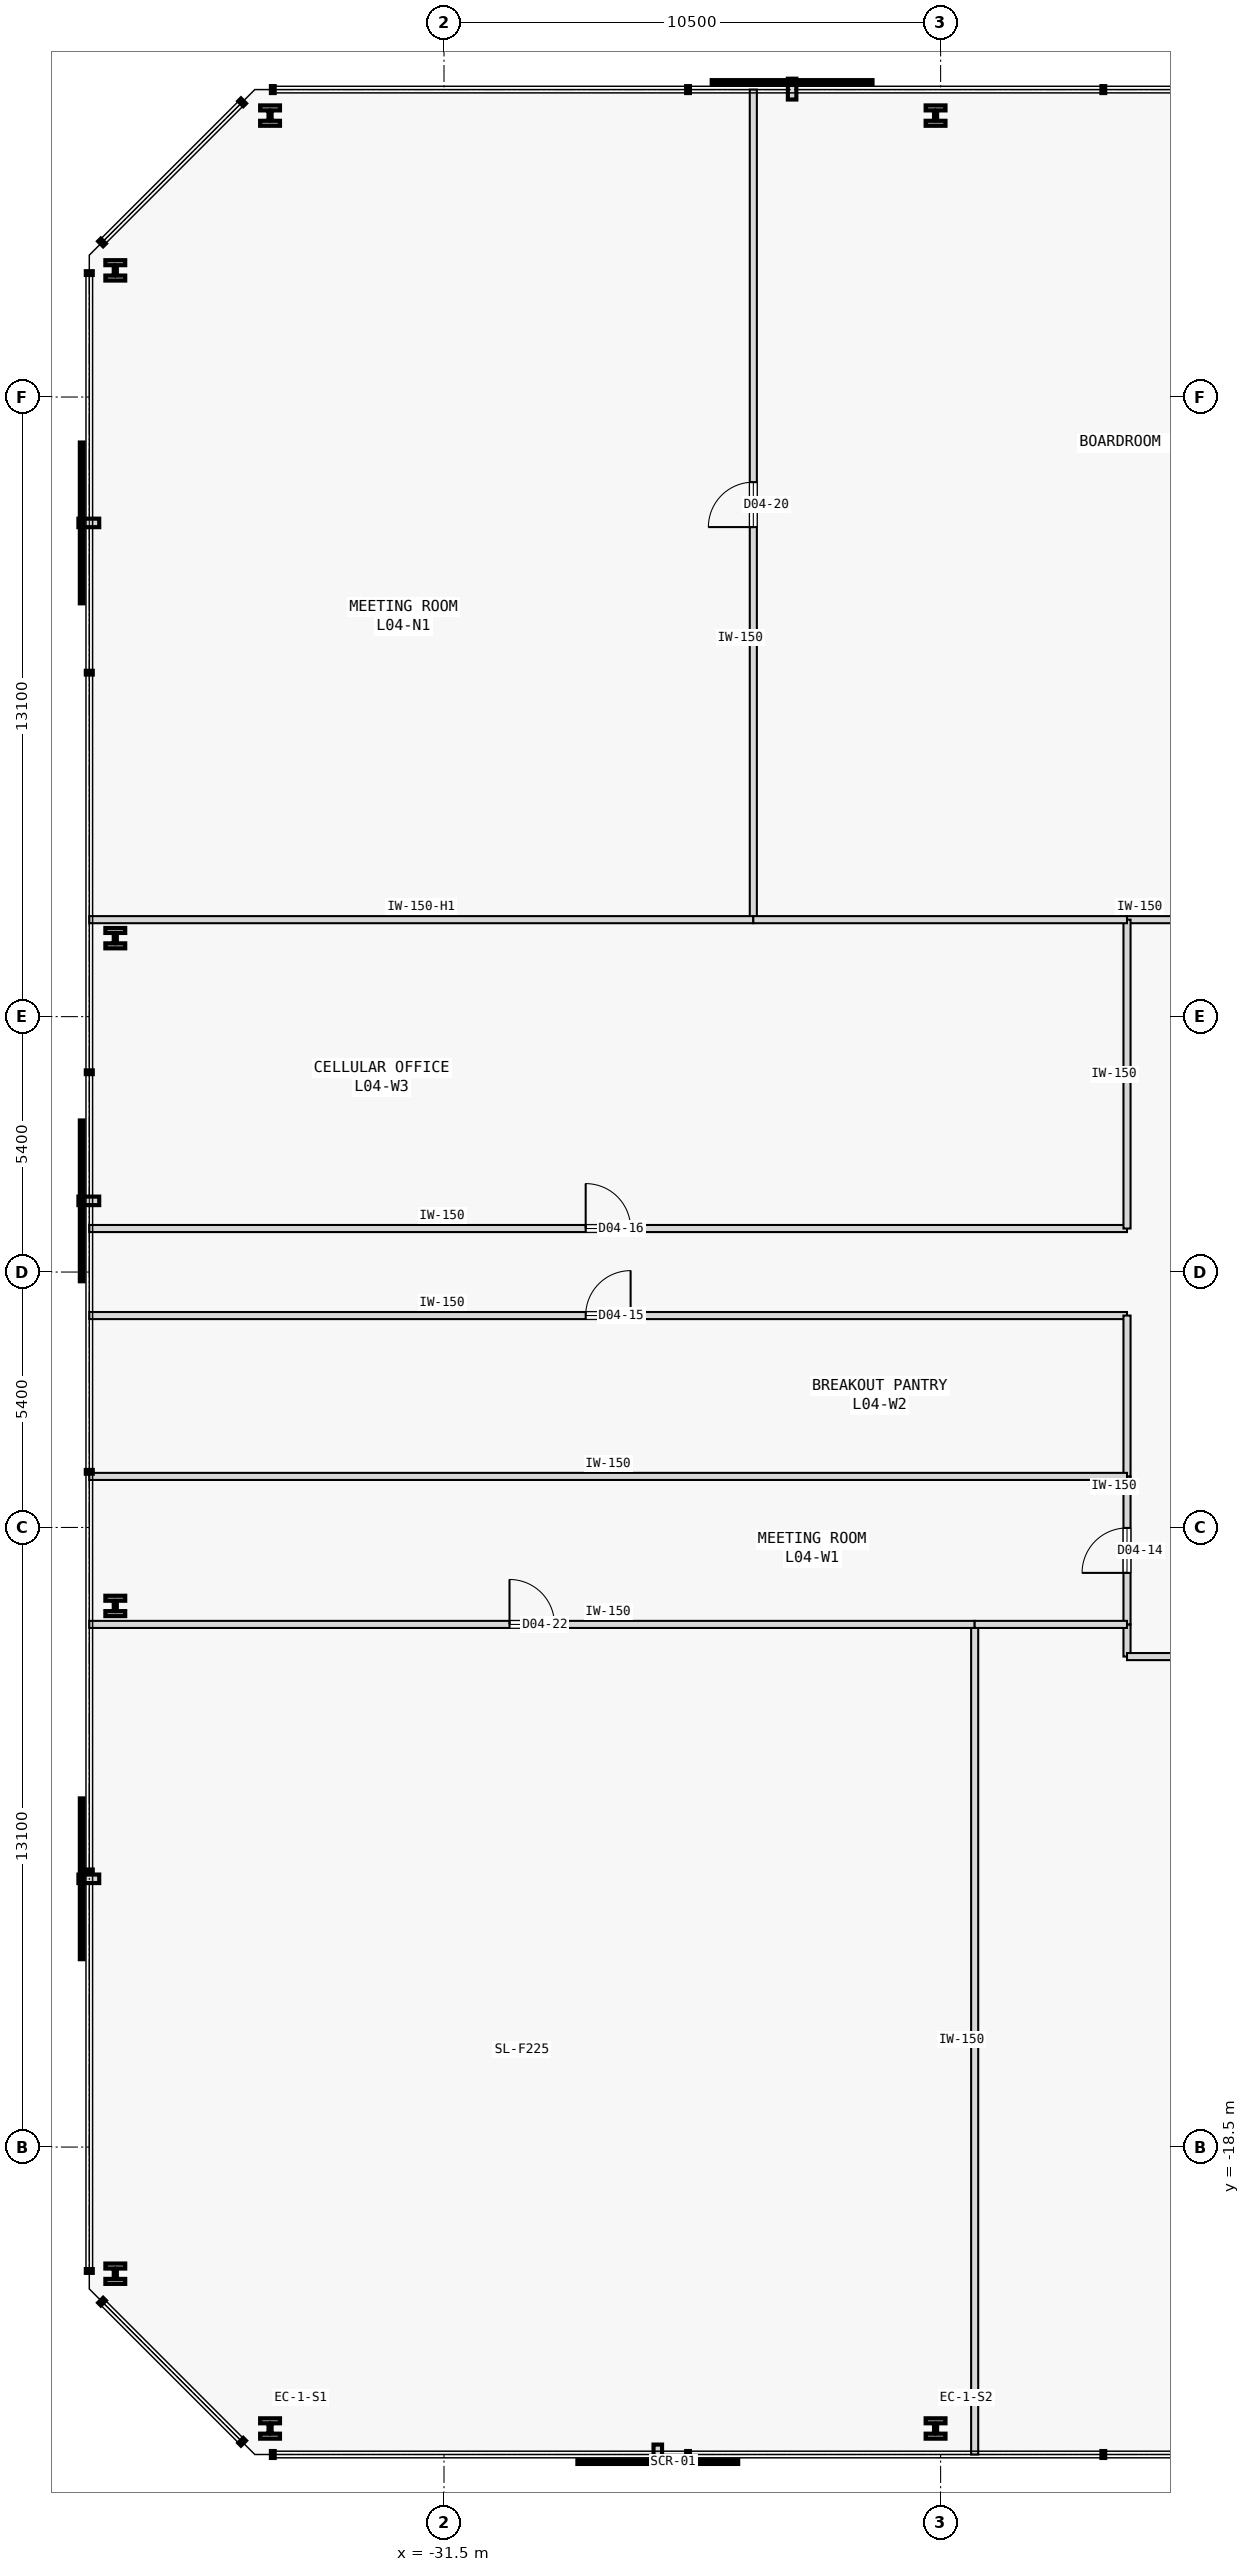
"""IFC4 building model, lengths in metres.
Left out: names, types, materials, properties, quantities, classifications, styles, units other than length and angle.
Written with IfcOpenShell. Run it as: python <this file> out.ifc"""

import sys

from ifc_helpers import new_model, si_unit, direction, frame, frame_2d, origin, origin_2d, place, context, subcontext, project, spatial, rectangle, i_section, extrude, element, fill, save


model = new_model("IFC4")
c1 = context("Model", 3, precision=1e-05, world=origin(), true_north=direction((0.0, 1.0)))
c2 = subcontext(c1, "Body", "Model", "MODEL_VIEW")
j1 = project(units=[si_unit("LENGTHUNIT", "METRE"), si_unit("PLANEANGLEUNIT", "RADIAN")], contexts=[c1])
p1 = place(None, origin())
s1 = spatial("IfcSite", under=j1, at=p1, CompositionType="ELEMENT")
p2 = place(p1, origin())
s2 = spatial("IfcBuilding", under=s1, at=p2, CompositionType="ELEMENT")
p3 = place(p2, frame((0.0, 0.0, 21.8)))
s3 = spatial("IfcBuildingStorey", under=s2, at=p3, CompositionType="ELEMENT", Elevation=21.8)
for number, where, z_axis, x_axis in (
    (1, (-35.178, -24.45, 0.0), (0.0, 0.0, 1.0), (1.0, 0.0, 0.0)),
    (2, (-21.107, -24.45, 0.0), (0.0, 0.0, 1.0), (1.0, 0.0, 0.0)),
    (3, (-21.107, 24.45, 0.0), (0.0, 0.0, 1.0), (1.0, 0.0, 0.0)),
    (4, (-35.178, 24.45, 0.0), (0.0, 0.0, 1.0), (1.0, 0.0, 0.0)),
    (5, (-38.45, 21.178, 0.0), (0.0, 0.0, 1.0), (1.0, 0.0, 0.0)),
    (6, (-38.45, 7.059, 0.0), (0.0, 0.0, 1.0), (1.0, 0.0, 0.0)),
    (7, (-38.45, -7.059, 0.0), (0.0, 0.0, 1.0), (1.0, 0.0, 0.0)),
    (8, (-38.45, -21.178, 0.0), (0.0, 0.0, 1.0), (1.0, 0.0, 0.0)),
):
    element("IfcColumn", number, at=place(p3, frame(where, z_axis=z_axis, x_axis=x_axis)), inside=s3, PredefinedType="COLUMN", context=c2, shape_type="SweptSolid", body=[
        extrude(i_section(OverallWidth=0.42, OverallDepth=0.431, WebThickness=0.065, FlangeThickness=0.106, FilletRadius=0.015, at=origin_2d()), origin(), (0.0, 0.0, 1.0), 3.8),
    ])
p4 = place(p3, frame((-17.059, 7.45, 0.0), z_axis=(0.0, 0.0, 1.0), x_axis=(1.0, 0.0, 0.0)))
e9 = element("IfcWall", 9, at=p4, inside=s3, PredefinedType="PARTITIONING", context=c2, shape_type="SweptSolid", body=[
    extrude(rectangle(XDim=7.699, YDim=0.15, at=frame_2d((3.85, 0.0))), origin(), (0.0, 0.0, 1.0), 3.575),
])
p5 = place(p4, frame((3.375, 0.0, 0.0)))
e10 = element("IfcOpeningElement", 10, at=p5, cuts=e9, PredefinedType="OPENING", context=c2, shape_type="SweptSolid", body=[
    extrude(rectangle(XDim=0.95, YDim=2.15, at=frame_2d((0.475, 1.075))), frame((0.0, 0.085, 0.0), z_axis=(0.0, -1.0, 0.0), x_axis=(1.0, 0.0, 0.0)), (0.0, 0.0, 1.0), 0.17),
])
p6 = place(p3, frame((-17.059, -8.13, 0.0), z_axis=(0.0, 0.0, 1.0), x_axis=(0.0, 1.0, 0.0)))
e11 = element("IfcWall", 11, at=p6, inside=s3, PredefinedType="PARTITIONING", context=c2, shape_type="SweptSolid", body=[
    extrude(rectangle(XDim=0.68, YDim=0.15, at=frame_2d((0.34, 0.0))), origin(), (0.0, 0.0, 1.0), 3.575),
])
p7 = place(p3, frame((-17.059, -8.13, 0.0), z_axis=(0.0, 0.0, 1.0), x_axis=(1.0, 0.0, 0.0)))
e12 = element("IfcWall", 12, at=p7, inside=s3, PredefinedType="PARTITIONING", context=c2, shape_type="SweptSolid", body=[
    extrude(rectangle(XDim=16.139, YDim=0.15, at=frame_2d((8.07, 0.0))), origin(), (0.0, 0.0, 1.0), 3.575),
])
p8 = place(p3, frame((-17.059, -7.45, 0.0), z_axis=(0.0, 0.0, 1.0), x_axis=(0.0, 1.0, 0.0)))
e13 = element("IfcWall", 13, at=p8, inside=s3, PredefinedType="PARTITIONING", context=c2, shape_type="SweptSolid", body=[
    extrude(rectangle(XDim=3.129, YDim=0.15, at=frame_2d((1.564, 0.0))), origin(), (0.0, 0.0, 1.0), 3.575),
])
p9 = place(p8, frame((1.09, 0.0, 0.0)))
e14 = element("IfcOpeningElement", 14, at=p9, cuts=e13, PredefinedType="OPENING", context=c2, shape_type="SweptSolid", body=[
    extrude(rectangle(XDim=0.95, YDim=2.15, at=frame_2d((0.475, 1.075))), frame((0.0, 0.085, 0.0), z_axis=(0.0, -1.0, 0.0), x_axis=(1.0, 0.0, 0.0)), (0.0, 0.0, 1.0), 0.17),
])
p10 = place(p3, frame((-39.0, -0.92, 0.0), z_axis=(0.0, 0.0, 1.0), x_axis=(1.0, 0.0, 0.0)))
e15 = element("IfcWall", 15, at=p10, inside=s3, PredefinedType="PARTITIONING", context=c2, shape_type="SweptSolid", body=[
    extrude(rectangle(XDim=21.941, YDim=0.15, at=frame_2d((10.97, 0.0))), origin(), (0.0, 0.0, 1.0), 3.575),
])
p11 = place(p10, frame((10.496, 0.0, 0.0)))
e16 = element("IfcOpeningElement", 16, at=p11, cuts=e15, PredefinedType="OPENING", context=c2, shape_type="SweptSolid", body=[
    extrude(rectangle(XDim=0.95, YDim=2.15, at=frame_2d((0.475, 1.075))), frame((0.0, 0.085, 0.0), z_axis=(0.0, -1.0, 0.0), x_axis=(1.0, 0.0, 0.0)), (0.0, 0.0, 1.0), 0.17),
])
p12 = place(p3, frame((-17.059, -4.321, 0.0), z_axis=(0.0, 0.0, 1.0), x_axis=(0.0, 1.0, 0.0)))
e17 = element("IfcWall", 17, at=p12, inside=s3, PredefinedType="PARTITIONING", context=c2, shape_type="SweptSolid", body=[
    extrude(rectangle(XDim=3.401, YDim=0.15, at=frame_2d((1.701, 0.0))), origin(), (0.0, 0.0, 1.0), 3.575),
])
p13 = place(p3, frame((-39.0, 0.92, 0.0), z_axis=(0.0, 0.0, 1.0), x_axis=(1.0, 0.0, 0.0)))
e18 = element("IfcWall", 18, at=p13, inside=s3, PredefinedType="PARTITIONING", context=c2, shape_type="SweptSolid", body=[
    extrude(rectangle(XDim=21.941, YDim=0.15, at=frame_2d((10.97, 0.0))), origin(), (0.0, 0.0, 1.0), 3.575),
])
p14 = place(p13, frame((10.496, 0.0, 0.0)))
e19 = element("IfcOpeningElement", 19, at=p14, cuts=e18, PredefinedType="OPENING", context=c2, shape_type="SweptSolid", body=[
    extrude(rectangle(XDim=0.95, YDim=2.15, at=frame_2d((0.475, 1.075))), frame((0.0, 0.085, 0.0), z_axis=(0.0, -1.0, 0.0), x_axis=(1.0, 0.0, 0.0)), (0.0, 0.0, 1.0), 0.17),
])
p15 = place(p3, frame((-17.059, 0.92, 0.0), z_axis=(0.0, 0.0, 1.0), x_axis=(0.0, 1.0, 0.0)))
e20 = element("IfcWall", 20, at=p15, inside=s3, PredefinedType="PARTITIONING", context=c2, shape_type="SweptSolid", body=[
    extrude(rectangle(XDim=6.53, YDim=0.15, at=frame_2d((3.265, 0.0))), origin(), (0.0, 0.0, 1.0), 3.575),
])
p16 = place(p3, frame((-24.96, 7.45, 0.0), z_axis=(0.0, 0.0, 1.0), x_axis=(0.0, 1.0, 0.0)))
e21 = element("IfcWall", 21, at=p16, inside=s3, PredefinedType="PARTITIONING", context=c2, shape_type="SweptSolid", body=[
    extrude(rectangle(XDim=17.55, YDim=0.15, at=frame_2d((8.775, 0.0))), origin(), (0.0, 0.0, 1.0), 3.575),
])
p17 = place(p16, frame((8.3, 0.0, 0.0)))
e22 = element("IfcOpeningElement", 22, at=p17, cuts=e21, PredefinedType="OPENING", context=c2, shape_type="SweptSolid", body=[
    extrude(rectangle(XDim=0.95, YDim=2.15, at=frame_2d((0.475, 1.075))), frame((0.0, 0.085, 0.0), z_axis=(0.0, -1.0, 0.0), x_axis=(1.0, 0.0, 0.0)), (0.0, 0.0, 1.0), 0.17),
])
p18 = place(p3, frame((-39.0, 7.45, 0.0), z_axis=(0.0, 0.0, 1.0), x_axis=(1.0, 0.0, 0.0)))
e23 = element("IfcWall", 23, at=p18, inside=s3, PredefinedType="PARTITIONING", context=c2, shape_type="SweptSolid", body=[
    extrude(rectangle(XDim=14.04, YDim=0.15, at=frame_2d((7.02, 0.0))), origin(), (0.0, 0.0, 1.0), 3.125),
])
p19 = place(p3, frame((-24.96, 7.45, 0.0), z_axis=(0.0, 0.0, 1.0), x_axis=(1.0, 0.0, 0.0)))
e24 = element("IfcWall", 24, at=p19, inside=s3, PredefinedType="PARTITIONING", context=c2, shape_type="SweptSolid", body=[
    extrude(rectangle(XDim=7.901, YDim=0.15, at=frame_2d((3.95, 0.0))), origin(), (0.0, 0.0, 1.0), 3.575),
])
p20 = place(p3, frame((-20.28, -25.0, 0.0), z_axis=(0.0, 0.0, 1.0), x_axis=(0.0, 1.0, 0.0)))
e25 = element("IfcWall", 25, at=p20, inside=s3, PredefinedType="PARTITIONING", context=c2, shape_type="SweptSolid", body=[
    extrude(rectangle(XDim=17.55, YDim=0.15, at=frame_2d((8.775, 0.0))), origin(), (0.0, 0.0, 1.0), 3.575),
])
p21 = place(p3, frame((-39.0, -7.45, 0.0), z_axis=(0.0, 0.0, 1.0), x_axis=(1.0, 0.0, 0.0)))
e26 = element("IfcWall", 26, at=p21, inside=s3, PredefinedType="PARTITIONING", context=c2, shape_type="SweptSolid", body=[
    extrude(rectangle(XDim=18.72, YDim=0.15, at=frame_2d((9.36, 0.0))), origin(), (0.0, 0.0, 1.0), 3.575),
])
p22 = place(p21, frame((8.885, 0.0, 0.0)))
e27 = element("IfcOpeningElement", 27, at=p22, cuts=e26, PredefinedType="OPENING", context=c2, shape_type="SweptSolid", body=[
    extrude(rectangle(XDim=0.95, YDim=2.15, at=frame_2d((0.475, 1.075))), frame((0.0, 0.085, 0.0), z_axis=(0.0, -1.0, 0.0), x_axis=(1.0, 0.0, 0.0)), (0.0, 0.0, 1.0), 0.17),
])
p23 = place(p3, frame((-20.28, -7.45, 0.0), z_axis=(0.0, 0.0, 1.0), x_axis=(1.0, 0.0, 0.0)))
e28 = element("IfcWall", 28, at=p23, inside=s3, PredefinedType="PARTITIONING", context=c2, shape_type="SweptSolid", body=[
    extrude(rectangle(XDim=3.221, YDim=0.15, at=frame_2d((1.61, 0.0))), origin(), (0.0, 0.0, 1.0), 3.575),
])
p24 = place(p3, frame((-39.0, -4.321, 0.0), z_axis=(0.0, 0.0, 1.0), x_axis=(1.0, 0.0, 0.0)))
e29 = element("IfcWall", 29, at=p24, inside=s3, PredefinedType="PARTITIONING", context=c2, shape_type="SweptSolid", body=[
    extrude(rectangle(XDim=21.941, YDim=0.15, at=frame_2d((10.97, 0.0))), origin(), (0.0, 0.0, 1.0), 3.575),
])
p25 = place(p9, origin())
e30 = element("IfcDoor", 30, at=p25, inside=s3, OperationType="SINGLE_SWING_LEFT", PredefinedType="DOOR", context=c2, shape_type="SweptSolid", body=[
    extrude(rectangle(XDim=0.95, YDim=2.15, at=frame_2d((0.475, 1.075))), frame((0.0, 0.025, 0.0), z_axis=(0.0, -1.0, 0.0), x_axis=(1.0, 0.0, 0.0)), (0.0, 0.0, 1.0), 0.05),
])
fill(e14, e30)
p26 = place(p11, origin())
e31 = element("IfcDoor", 31, at=p26, inside=s3, OperationType="SINGLE_SWING_RIGHT", PredefinedType="DOOR", context=c2, shape_type="SweptSolid", body=[
    extrude(rectangle(XDim=0.95, YDim=2.15, at=frame_2d((0.475, 1.075))), frame((0.0, 0.025, 0.0), z_axis=(0.0, -1.0, 0.0), x_axis=(1.0, 0.0, 0.0)), (0.0, 0.0, 1.0), 0.05),
])
fill(e16, e31)
p27 = place(p14, origin())
e32 = element("IfcDoor", 32, at=p27, inside=s3, OperationType="SINGLE_SWING_LEFT", PredefinedType="DOOR", context=c2, shape_type="SweptSolid", body=[
    extrude(rectangle(XDim=0.95, YDim=2.15, at=frame_2d((0.475, 1.075))), frame((0.0, 0.025, 0.0), z_axis=(0.0, -1.0, 0.0), x_axis=(1.0, 0.0, 0.0)), (0.0, 0.0, 1.0), 0.05),
])
fill(e19, e32)
p28 = place(p17, origin())
e33 = element("IfcDoor", 33, at=p28, inside=s3, OperationType="SINGLE_SWING_LEFT", PredefinedType="DOOR", context=c2, shape_type="SweptSolid", body=[
    extrude(rectangle(XDim=0.95, YDim=2.15, at=frame_2d((0.475, 1.075))), frame((0.0, 0.025, 0.0), z_axis=(0.0, -1.0, 0.0), x_axis=(1.0, 0.0, 0.0)), (0.0, 0.0, 1.0), 0.05),
])
fill(e22, e33)
p29 = place(p22, origin())
e34 = element("IfcDoor", 34, at=p29, inside=s3, OperationType="SINGLE_SWING_LEFT", PredefinedType="DOOR", context=c2, shape_type="SweptSolid", body=[
    extrude(rectangle(XDim=0.95, YDim=2.15, at=frame_2d((0.475, 1.075))), frame((0.0, 0.025, 0.0), z_axis=(0.0, -1.0, 0.0), x_axis=(1.0, 0.0, 0.0)), (0.0, 0.0, 1.0), 0.05),
])
fill(e27, e34)
save(model, sys.argv[1])
